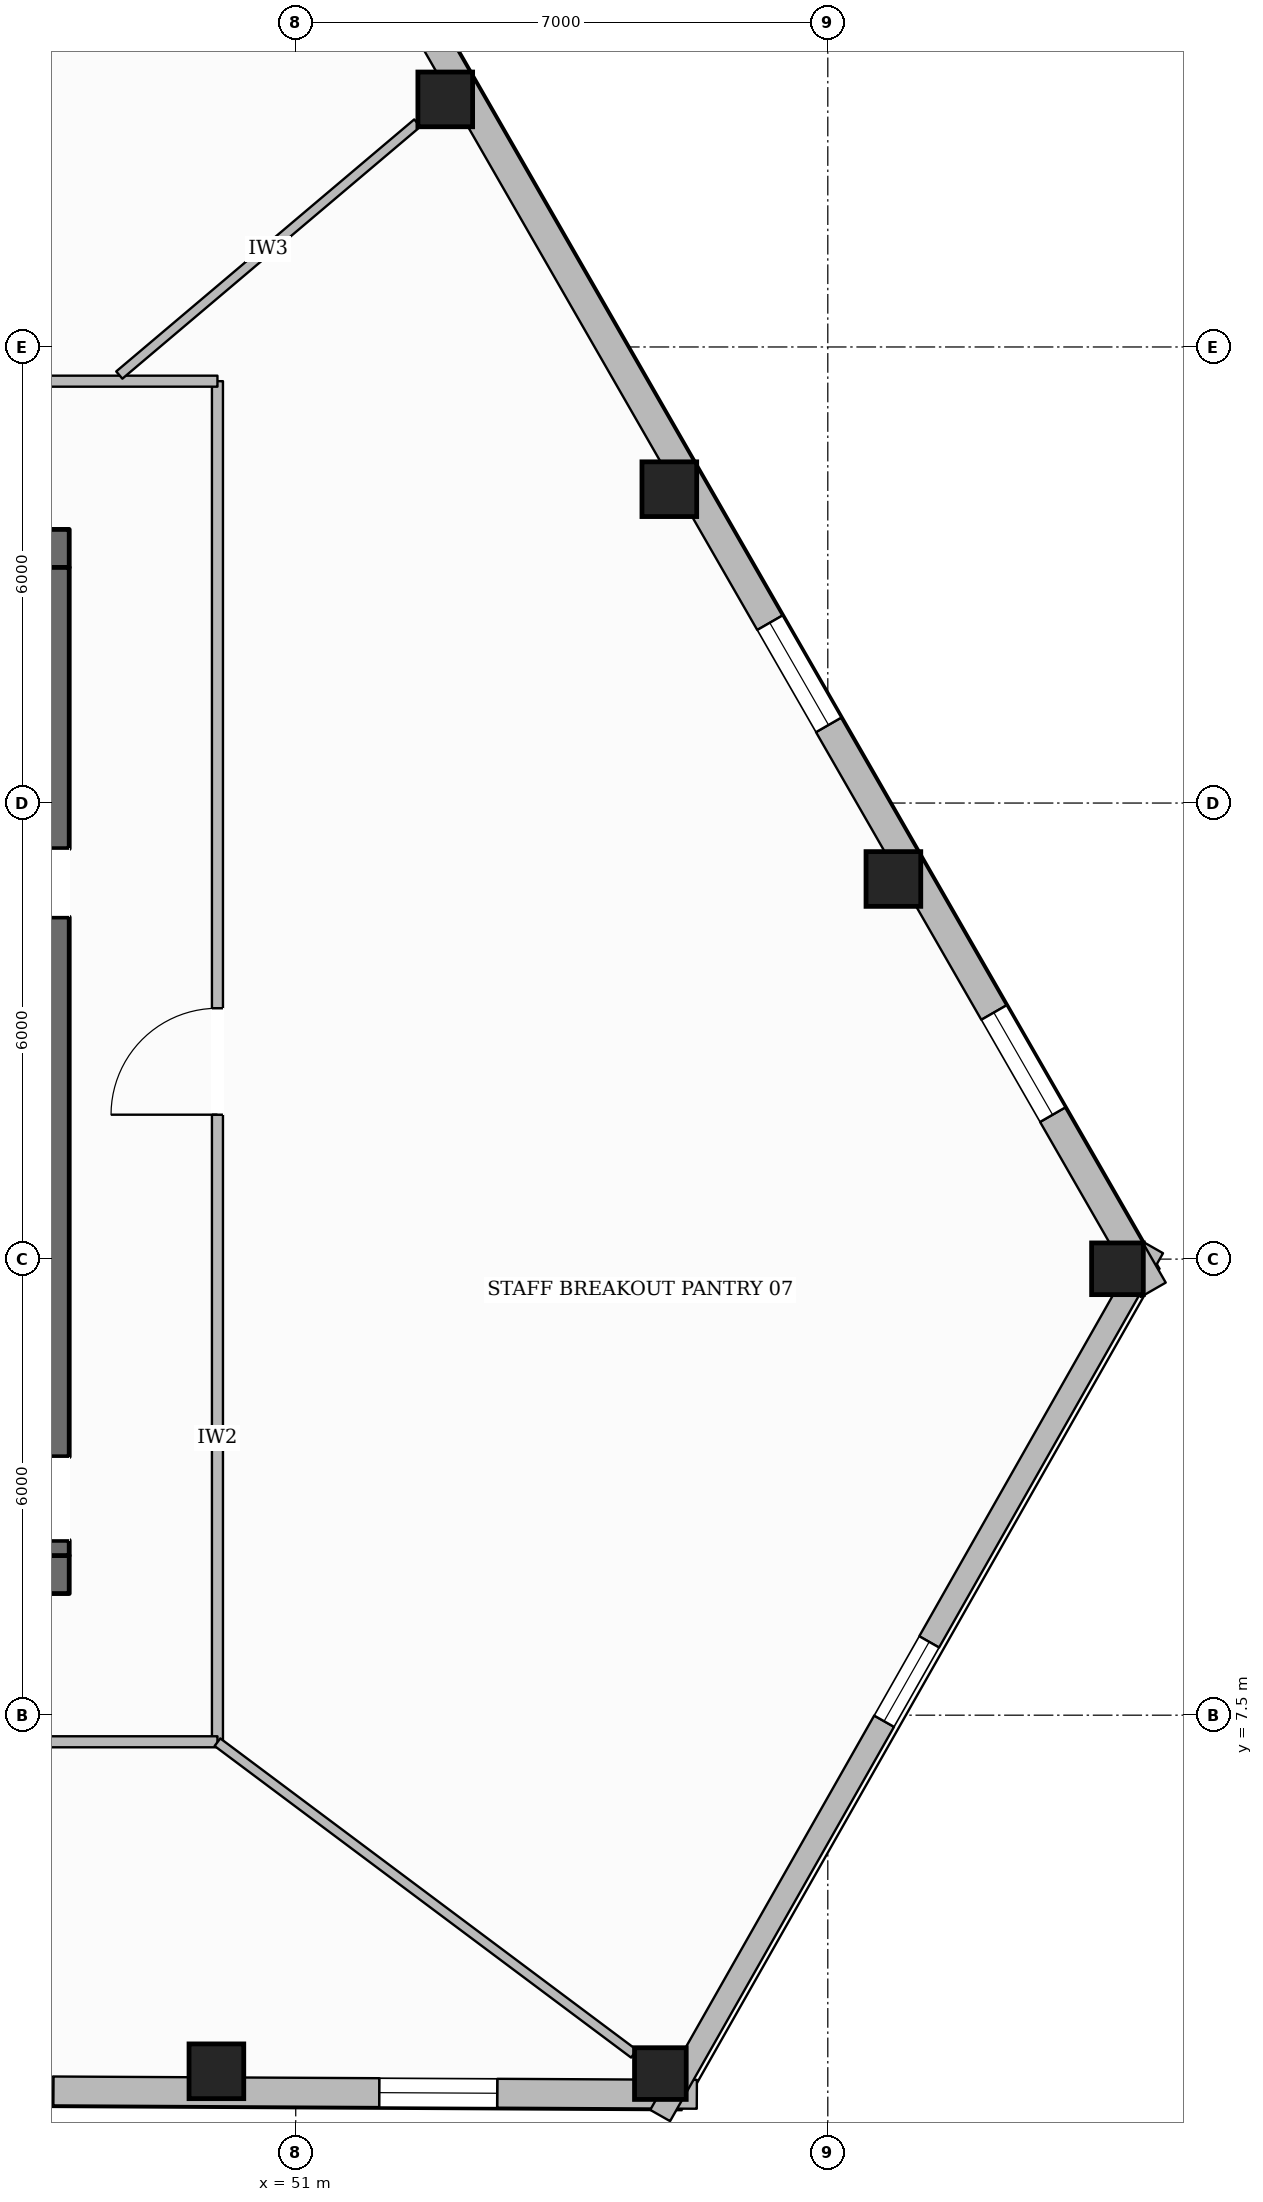
"""IFC4 building model, lengths in metres.
Left out: names, types, materials, properties, quantities, classifications, styles, units other than length and angle.
Written with IfcOpenShell. Run it as: python <this file> out.ifc"""

import sys

from ifc_helpers import new_model, si_unit, direction, frame, frame_2d, origin, origin_2d, place, context, subcontext, project, spatial, rectangle, hollow_rectangle, extrude, element, fill, save


model = new_model("IFC4")
c1 = context("Model", 3, precision=1e-05, world=origin(), true_north=direction((0.0, 1.0)))
c2 = subcontext(c1, "Body", "Model", "MODEL_VIEW")
j1 = project(units=[si_unit("LENGTHUNIT", "METRE"), si_unit("PLANEANGLEUNIT", "RADIAN")], contexts=[c1])
p1 = place(None, origin())
s1 = spatial("IfcSite", under=j1, at=p1, CompositionType="ELEMENT")
p2 = place(p1, origin())
s2 = spatial("IfcBuilding", under=s1, at=p2, CompositionType="ELEMENT")
p3 = place(p2, frame((0.0, 0.0, 100.9)))
s3 = spatial("IfcBuildingStorey", under=s2, at=p3, CompositionType="ELEMENT", Elevation=100.9)
p4 = place(p3, frame((27.98, 9.35, 0.0), z_axis=(0.0, 0.0, 1.0), x_axis=(1.0, 0.0, 0.0)))
e1 = element("IfcWall", 1, at=p4, inside=s3, PredefinedType="SOLIDWALL", context=c2, shape_type="SweptSolid", body=[
    extrude(rectangle(XDim=20.04, YDim=0.5, at=frame_2d((10.02, 0.0))), origin(), (0.0, 0.0, 1.0), 3.6),
])
p5 = place(p4, frame((10.52, 0.0, 0.0)))
e2 = element("IfcOpeningElement", 2, at=p5, cuts=e1, PredefinedType="OPENING", context=c2, shape_type="SweptSolid", body=[
    extrude(rectangle(XDim=1.4, YDim=2.2, at=frame_2d((0.7, 1.1))), frame((0.0, 0.26, 0.0), z_axis=(0.0, -1.0, 0.0), x_axis=(1.0, 0.0, 0.0)), (0.0, 0.0, 1.0), 0.52),
])
p6 = place(p3, frame((27.98, 22.85, 0.0), z_axis=(0.0, 0.0, 1.0), x_axis=(1.0, 0.0, 0.0)))
e3 = element("IfcWall", 3, at=p6, inside=s3, PredefinedType="SOLIDWALL", context=c2, shape_type="SweptSolid", body=[
    extrude(rectangle(XDim=20.04, YDim=0.5, at=frame_2d((10.02, 0.0))), origin(), (0.0, 0.0, 1.0), 3.6),
])
p7 = place(p6, frame((6.295, 0.0, 0.0)))
e4 = element("IfcOpeningElement", 4, at=p7, cuts=e3, PredefinedType="OPENING", context=c2, shape_type="SweptSolid", body=[
    extrude(rectangle(XDim=1.05, YDim=2.15, at=frame_2d((0.525, 1.075))), frame((0.0, 0.26, 0.0), z_axis=(0.0, -1.0, 0.0), x_axis=(1.0, 0.0, 0.0)), (0.0, 0.0, 1.0), 0.52),
])
p8 = place(p6, frame((12.695, 0.0, 0.0)))
e5 = element("IfcOpeningElement", 5, at=p8, cuts=e3, PredefinedType="OPENING", context=c2, shape_type="SweptSolid", body=[
    extrude(rectangle(XDim=1.05, YDim=2.15, at=frame_2d((0.525, 1.075))), frame((0.0, 0.26, 0.0), z_axis=(0.0, -1.0, 0.0), x_axis=(1.0, 0.0, 0.0)), (0.0, 0.0, 1.0), 0.52),
])
p9 = place(p3, frame((47.77, 9.6, 0.0), z_axis=(0.0, 0.0, 1.0), x_axis=(0.0, 1.0, 0.0)))
e6 = element("IfcWall", 6, at=p9, inside=s3, PredefinedType="SOLIDWALL", context=c2, shape_type="SweptSolid", body=[
    extrude(rectangle(XDim=13.0, YDim=0.5, at=frame_2d((6.5, 0.0))), origin(), (0.0, 0.0, 1.0), 3.6),
])
p10 = place(p9, frame((0.2, 0.0, 0.0)))
e7 = element("IfcOpeningElement", 7, at=p10, cuts=e6, PredefinedType="OPENING", context=c2, shape_type="SweptSolid", body=[
    extrude(rectangle(XDim=1.1, YDim=2.15, at=frame_2d((0.55, 1.075))), frame((0.0, 0.26, 0.0), z_axis=(0.0, -1.0, 0.0), x_axis=(1.0, 0.0, 0.0)), (0.0, 0.0, 1.0), 0.52),
])
p11 = place(p9, frame((8.4, 0.0, 0.0)))
e8 = element("IfcOpeningElement", 8, at=p11, cuts=e6, PredefinedType="OPENING", context=c2, shape_type="SweptSolid", body=[
    extrude(rectangle(XDim=0.9, YDim=2.1, at=frame_2d((0.45, 1.05))), frame((0.0, 0.26, 0.0), z_axis=(0.0, -1.0, 0.0), x_axis=(1.0, 0.0, 0.0)), (0.0, 0.0, 1.0), 0.52),
])
p12 = place(p3, frame((49.956, 2.815, 0.0), z_axis=(0.0, 0.0, 1.0), x_axis=(1.0, 0.0, 0.0)))
e9 = element("IfcColumn", 9, at=p12, inside=s3, PredefinedType="COLUMN", context=c2, shape_type="SweptSolid", body=[
    extrude(hollow_rectangle(XDim=0.72, YDim=0.72, WallThickness=0.032, at=origin_2d()), origin(), (0.0, 0.0, 1.0), 3.6),
])
for number, where, z_axis, x_axis in (
    (10, (55.797, 2.785, 0.0), (0.0, 0.0, 1.0), (1.0, 0.0, 0.0)),
    (11, (61.811, 13.373, 0.0), (0.0, 0.0, 1.0), (1.0, 0.0, 0.0)),
):
    element("IfcColumn", number, at=place(p3, frame(where, z_axis=z_axis, x_axis=x_axis)), inside=s3, PredefinedType="COLUMN", context=c2, shape_type="SweptSolid", body=[
        extrude(hollow_rectangle(XDim=0.68, YDim=0.68, WallThickness=0.03, at=origin_2d()), origin(), (0.0, 0.0, 1.0), 3.6),
    ])
for number, where, z_axis, x_axis in (
    (12, (58.863, 18.501, 0.0), (0.0, 0.0, 1.0), (1.0, 0.0, 0.0)),
    (13, (55.915, 23.629, 0.0), (0.0, 0.0, 1.0), (1.0, 0.0, 0.0)),
    (14, (52.967, 28.757, 0.0), (0.0, 0.0, 1.0), (1.0, 0.0, 0.0)),
):
    element("IfcColumn", number, at=place(p3, frame(where, z_axis=z_axis, x_axis=x_axis)), inside=s3, PredefinedType="COLUMN", context=c2, shape_type="SweptSolid", body=[
        extrude(hollow_rectangle(XDim=0.72, YDim=0.72, WallThickness=0.032, at=origin_2d()), origin(), (0.0, 0.0, 1.0), 3.6),
    ])
p13 = place(p3, frame((56.277, 2.512, 0.0), z_axis=(0.0, 0.0, 1.0), x_axis=(-0.999986545033, 0.005187461141, 0.0)))
e15 = element("IfcWall", 15, at=p13, inside=s3, PredefinedType="STANDARD", context=c2, shape_type="SweptSolid", body=[
    extrude(rectangle(XDim=36.004, YDim=0.38, at=frame_2d((18.002, 0.0))), origin(), (0.0, 0.0, 1.0), 3.059),
])
p14 = place(p13, frame((31.832, 0.0, 0.65)))
e16 = element("IfcOpeningElement", 16, at=p14, cuts=e15, PredefinedType="OPENING", context=c2, shape_type="SweptSolid", body=[
    extrude(rectangle(XDim=1.55, YDim=1.75, at=frame_2d((0.775, 0.875))), frame((0.0, 0.2, 0.0), z_axis=(0.0, -1.0, 0.0), x_axis=(1.0, 0.0, 0.0)), (0.0, 0.0, 1.0), 0.4),
])
p15 = place(p13, frame((25.991, 0.0, 0.65)))
e17 = element("IfcOpeningElement", 17, at=p15, cuts=e15, PredefinedType="OPENING", context=c2, shape_type="SweptSolid", body=[
    extrude(rectangle(XDim=1.55, YDim=1.75, at=frame_2d((0.775, 0.875))), frame((0.0, 0.2, 0.0), z_axis=(0.0, -1.0, 0.0), x_axis=(1.0, 0.0, 0.0)), (0.0, 0.0, 1.0), 0.4),
])
p16 = place(p13, frame((14.309, 0.0, 0.65)))
e18 = element("IfcOpeningElement", 18, at=p16, cuts=e15, PredefinedType="OPENING", context=c2, shape_type="SweptSolid", body=[
    extrude(rectangle(XDim=1.55, YDim=1.75, at=frame_2d((0.775, 0.875))), frame((0.0, 0.2, 0.0), z_axis=(0.0, -1.0, 0.0), x_axis=(1.0, 0.0, 0.0)), (0.0, 0.0, 1.0), 0.4),
])
p17 = place(p13, frame((8.468, 0.0, 0.65)))
e19 = element("IfcOpeningElement", 19, at=p17, cuts=e15, PredefinedType="OPENING", context=c2, shape_type="SweptSolid", body=[
    extrude(rectangle(XDim=1.55, YDim=1.75, at=frame_2d((0.775, 0.875))), frame((0.0, 0.2, 0.0), z_axis=(0.0, -1.0, 0.0), x_axis=(1.0, 0.0, 0.0)), (0.0, 0.0, 1.0), 0.4),
])
p18 = place(p13, frame((2.627, 0.0, 0.65)))
e20 = element("IfcOpeningElement", 20, at=p18, cuts=e15, PredefinedType="OPENING", context=c2, shape_type="SweptSolid", body=[
    extrude(rectangle(XDim=1.55, YDim=1.75, at=frame_2d((0.775, 0.875))), frame((0.0, 0.2, 0.0), z_axis=(0.0, -1.0, 0.0), x_axis=(1.0, 0.0, 0.0)), (0.0, 0.0, 1.0), 0.4),
])
p19 = place(p3, frame((62.28, 13.652, 0.0), z_axis=(0.0, 0.0, 1.0), x_axis=(-0.493862788891, -0.869539847131, 0.0)))
e21 = element("IfcWall", 21, at=p19, inside=s3, PredefinedType="STANDARD", context=c2, shape_type="SweptSolid", body=[
    extrude(rectangle(XDim=13.132, YDim=0.3, at=frame_2d((6.566, 0.0))), origin(), (0.0, 0.0, 1.0), 3.059),
])
p20 = place(p19, frame((5.966, 0.0, 0.65)))
e22 = element("IfcOpeningElement", 22, at=p20, cuts=e21, PredefinedType="OPENING", context=c2, shape_type="SweptSolid", body=[
    extrude(rectangle(XDim=1.2, YDim=1.7, at=frame_2d((0.6, 0.85))), frame((0.0, 0.16, 0.0), z_axis=(0.0, -1.0, 0.0), x_axis=(1.0, 0.0, 0.0)), (0.0, 0.0, 1.0), 0.32),
])
p21 = place(p3, frame((44.12, 44.689, 0.0), z_axis=(0.0, 0.0, 1.0), x_axis=(0.498376840975, -0.866960509124, 0.0)))
e23 = element("IfcWall", 23, at=p21, inside=s3, PredefinedType="STANDARD", context=c2, shape_type="SweptSolid", body=[
    extrude(rectangle(XDim=36.441, YDim=0.38, at=frame_2d((18.22, 0.0))), origin(), (0.0, 0.0, 1.0), 3.059),
])
p22 = place(p21, frame((32.234, 0.0, 0.65)))
e24 = element("IfcOpeningElement", 24, at=p22, cuts=e23, PredefinedType="OPENING", context=c2, shape_type="SweptSolid", body=[
    extrude(rectangle(XDim=1.55, YDim=1.75, at=frame_2d((0.775, 0.875))), frame((0.0, 0.2, 0.0), z_axis=(0.0, -1.0, 0.0), x_axis=(1.0, 0.0, 0.0)), (0.0, 0.0, 1.0), 0.4),
])
p23 = place(p21, frame((26.319, 0.0, 0.65)))
e25 = element("IfcOpeningElement", 25, at=p23, cuts=e23, PredefinedType="OPENING", context=c2, shape_type="SweptSolid", body=[
    extrude(rectangle(XDim=1.55, YDim=1.75, at=frame_2d((0.775, 0.875))), frame((0.0, 0.2, 0.0), z_axis=(0.0, -1.0, 0.0), x_axis=(1.0, 0.0, 0.0)), (0.0, 0.0, 1.0), 0.4),
])
p24 = place(p21, frame((14.489, 0.0, 0.65)))
e26 = element("IfcOpeningElement", 26, at=p24, cuts=e23, PredefinedType="OPENING", context=c2, shape_type="SweptSolid", body=[
    extrude(rectangle(XDim=1.55, YDim=1.75, at=frame_2d((0.775, 0.875))), frame((0.0, 0.2, 0.0), z_axis=(0.0, -1.0, 0.0), x_axis=(1.0, 0.0, 0.0)), (0.0, 0.0, 1.0), 0.4),
])
p25 = place(p21, frame((8.573, 0.0, 0.65)))
e27 = element("IfcOpeningElement", 27, at=p25, cuts=e23, PredefinedType="OPENING", context=c2, shape_type="SweptSolid", body=[
    extrude(rectangle(XDim=1.55, YDim=1.75, at=frame_2d((0.775, 0.875))), frame((0.0, 0.2, 0.0), z_axis=(0.0, -1.0, 0.0), x_axis=(1.0, 0.0, 0.0)), (0.0, 0.0, 1.0), 0.4),
])
p26 = place(p21, frame((2.658, 0.0, 0.65)))
e28 = element("IfcOpeningElement", 28, at=p26, cuts=e23, PredefinedType="OPENING", context=c2, shape_type="SweptSolid", body=[
    extrude(rectangle(XDim=1.55, YDim=1.75, at=frame_2d((0.775, 0.875))), frame((0.0, 0.2, 0.0), z_axis=(0.0, -1.0, 0.0), x_axis=(1.0, 0.0, 0.0)), (0.0, 0.0, 1.0), 0.4),
])
p27 = place(p3, frame((49.97, 7.15, 0.0), z_axis=(0.0, 0.0, 1.0), x_axis=(0.0, 1.0, 0.0)))
e29 = element("IfcWall", 29, at=p27, inside=s3, PredefinedType="PARTITIONING", context=c2, shape_type="SweptSolid", body=[
    extrude(rectangle(XDim=17.9, YDim=0.145, at=frame_2d((8.95, 0.0))), origin(), (0.0, 0.0, 1.0), 3.288),
])
p28 = place(p27, frame((8.25, 0.0, 0.0)))
e30 = element("IfcOpeningElement", 30, at=p28, cuts=e29, PredefinedType="OPENING", context=c2, shape_type="SweptSolid", body=[
    extrude(rectangle(XDim=1.4, YDim=2.2, at=frame_2d((0.7, 1.1))), frame((0.0, 0.083, 0.0), z_axis=(0.0, -1.0, 0.0), x_axis=(1.0, 0.0, 0.0)), (0.0, 0.0, 1.0), 0.165),
])
p29 = place(p3, frame((49.97, 25.05, 0.0), z_axis=(0.0, 0.0, 1.0), x_axis=(-1.0, 0.0, 0.0)))
e31 = element("IfcWall", 31, at=p29, inside=s3, PredefinedType="PARTITIONING", context=c2, shape_type="SweptSolid", body=[
    extrude(rectangle(XDim=23.94, YDim=0.145, at=frame_2d((11.97, 0.0))), origin(), (0.0, 0.0, 1.0), 3.6),
])
p30 = place(p29, frame((5.824, 0.0, 0.0)))
e32 = element("IfcOpeningElement", 32, at=p30, cuts=e31, PredefinedType="OPENING", context=c2, shape_type="SweptSolid", body=[
    extrude(rectangle(XDim=1.4, YDim=2.2, at=frame_2d((0.7, 1.1))), frame((0.0, 0.083, 0.0), z_axis=(0.0, -1.0, 0.0), x_axis=(1.0, 0.0, 0.0)), (0.0, 0.0, 1.0), 0.165),
])
p31 = place(p29, frame((16.238, 0.0, 0.0)))
e33 = element("IfcOpeningElement", 33, at=p31, cuts=e31, PredefinedType="OPENING", context=c2, shape_type="SweptSolid", body=[
    extrude(rectangle(XDim=1.4, YDim=2.2, at=frame_2d((0.7, 1.1))), frame((0.0, 0.083, 0.0), z_axis=(0.0, -1.0, 0.0), x_axis=(1.0, 0.0, 0.0)), (0.0, 0.0, 1.0), 0.165),
])
p32 = place(p3, frame((26.03, 7.15, 0.0), z_axis=(0.0, 0.0, 1.0), x_axis=(1.0, 0.0, 0.0)))
e34 = element("IfcWall", 34, at=p32, inside=s3, PredefinedType="PARTITIONING", context=c2, shape_type="SweptSolid", body=[
    extrude(rectangle(XDim=23.94, YDim=0.145, at=frame_2d((11.97, 0.0))), origin(), (0.0, 0.0, 1.0), 3.6),
])
p33 = place(p32, frame((4.53, 0.0, 0.0)))
e35 = element("IfcOpeningElement", 35, at=p33, cuts=e34, PredefinedType="OPENING", context=c2, shape_type="SweptSolid", body=[
    extrude(rectangle(XDim=0.88, YDim=2.1, at=frame_2d((0.44, 1.05))), frame((0.0, 0.083, 0.0), z_axis=(0.0, -1.0, 0.0), x_axis=(1.0, 0.0, 0.0)), (0.0, 0.0, 1.0), 0.165),
])
p34 = place(p32, frame((7.05, 0.0, 0.0)))
e36 = element("IfcOpeningElement", 36, at=p34, cuts=e34, PredefinedType="OPENING", context=c2, shape_type="SweptSolid", body=[
    extrude(rectangle(XDim=0.88, YDim=2.1, at=frame_2d((0.44, 1.05))), frame((0.0, 0.083, 0.0), z_axis=(0.0, -1.0, 0.0), x_axis=(1.0, 0.0, 0.0)), (0.0, 0.0, 1.0), 0.165),
])
p35 = place(p32, frame((9.43, 0.0, 0.0)))
e37 = element("IfcOpeningElement", 37, at=p35, cuts=e34, PredefinedType="OPENING", context=c2, shape_type="SweptSolid", body=[
    extrude(rectangle(XDim=0.96, YDim=2.1, at=frame_2d((0.48, 1.05))), frame((0.0, 0.083, 0.0), z_axis=(0.0, -1.0, 0.0), x_axis=(1.0, 0.0, 0.0)), (0.0, 0.0, 1.0), 0.165),
])
p36 = place(p32, frame((1.456, 0.0, 0.0)))
e38 = element("IfcOpeningElement", 38, at=p36, cuts=e34, PredefinedType="OPENING", context=c2, shape_type="SweptSolid", body=[
    extrude(rectangle(XDim=0.98, YDim=2.15, at=frame_2d((0.49, 1.075))), frame((0.0, 0.083, 0.0), z_axis=(0.0, -1.0, 0.0), x_axis=(1.0, 0.0, 0.0)), (0.0, 0.0, 1.0), 0.165),
])
p37 = place(p32, frame((16.714, 0.0, 0.0)))
e39 = element("IfcOpeningElement", 39, at=p37, cuts=e34, PredefinedType="OPENING", context=c2, shape_type="SweptSolid", body=[
    extrude(rectangle(XDim=1.4, YDim=2.2, at=frame_2d((0.7, 1.1))), frame((0.0, 0.083, 0.0), z_axis=(0.0, -1.0, 0.0), x_axis=(1.0, 0.0, 0.0)), (0.0, 0.0, 1.0), 0.165),
])
p38 = place(p3, frame((48.679, 25.131, 0.0), z_axis=(0.0, 0.0, 1.0), x_axis=(0.763563012799, 0.645733323815, 0.0)))
e40 = element("IfcWall", 40, at=p38, inside=s3, PredefinedType="PARTITIONING", context=c2, shape_type="SweptSolid", body=[
    extrude(rectangle(XDim=5.134, YDim=0.125, at=frame_2d((2.567, 0.0))), origin(), (0.0, 0.0, 1.0), 3.141),
])
p39 = place(p3, frame((49.97, 7.145, 0.0), z_axis=(0.0, 0.0, 1.0), x_axis=(0.800705856265, -0.599057703183, 0.0)))
e41 = element("IfcWall", 41, at=p39, inside=s3, PredefinedType="PARTITIONING", context=c2, shape_type="SweptSolid", body=[
    extrude(rectangle(XDim=6.843, YDim=0.125, at=frame_2d((3.421, 0.0))), origin(), (0.0, 0.0, 1.0), 3.141),
])
p40 = place(p17, origin())
e42 = element("IfcWindow", 42, at=p40, inside=s3, PartitioningType="SINGLE_PANEL", PredefinedType="WINDOW", context=c2, shape_type="SweptSolid", body=[
    extrude(rectangle(XDim=1.55, YDim=1.75, at=frame_2d((0.775, 0.875))), frame((0.0, 0.03, 0.0), z_axis=(0.0, -1.0, 0.0), x_axis=(1.0, 0.0, 0.0)), (0.0, 0.0, 1.0), 0.06),
])
fill(e19, e42)
p41 = place(p18, origin())
e43 = element("IfcWindow", 43, at=p41, inside=s3, PartitioningType="SINGLE_PANEL", PredefinedType="WINDOW", context=c2, shape_type="SweptSolid", body=[
    extrude(rectangle(XDim=1.55, YDim=1.75, at=frame_2d((0.775, 0.875))), frame((0.0, 0.03, 0.0), z_axis=(0.0, -1.0, 0.0), x_axis=(1.0, 0.0, 0.0)), (0.0, 0.0, 1.0), 0.06),
])
fill(e20, e43)
p42 = place(p22, origin())
e44 = element("IfcWindow", 44, at=p42, inside=s3, PartitioningType="SINGLE_PANEL", PredefinedType="WINDOW", context=c2, shape_type="SweptSolid", body=[
    extrude(rectangle(XDim=1.55, YDim=1.75, at=frame_2d((0.775, 0.875))), frame((0.0, 0.03, 0.0), z_axis=(0.0, -1.0, 0.0), x_axis=(1.0, 0.0, 0.0)), (0.0, 0.0, 1.0), 0.06),
])
fill(e24, e44)
p43 = place(p23, origin())
e45 = element("IfcWindow", 45, at=p43, inside=s3, PartitioningType="SINGLE_PANEL", PredefinedType="WINDOW", context=c2, shape_type="SweptSolid", body=[
    extrude(rectangle(XDim=1.55, YDim=1.75, at=frame_2d((0.775, 0.875))), frame((0.0, 0.03, 0.0), z_axis=(0.0, -1.0, 0.0), x_axis=(1.0, 0.0, 0.0)), (0.0, 0.0, 1.0), 0.06),
])
fill(e25, e45)
p44 = place(p20, origin())
e46 = element("IfcWindow", 46, at=p44, inside=s3, PartitioningType="SINGLE_PANEL", PredefinedType="WINDOW", context=c2, shape_type="SweptSolid", body=[
    extrude(rectangle(XDim=1.2, YDim=1.7, at=frame_2d((0.6, 0.85))), frame((0.0, 0.03, 0.0), z_axis=(0.0, -1.0, 0.0), x_axis=(1.0, 0.0, 0.0)), (0.0, 0.0, 1.0), 0.06),
])
fill(e22, e46)
p45 = place(p28, origin())
e47 = element("IfcDoor", 47, at=p45, inside=s3, OperationType="SINGLE_SWING_LEFT", PredefinedType="DOOR", context=c2, shape_type="SweptSolid", body=[
    extrude(rectangle(XDim=1.4, YDim=2.2, at=frame_2d((0.7, 1.1))), frame((0.0, 0.025, 0.0), z_axis=(0.0, -1.0, 0.0), x_axis=(1.0, 0.0, 0.0)), (0.0, 0.0, 1.0), 0.05),
])
fill(e30, e47)
save(model, sys.argv[1])
